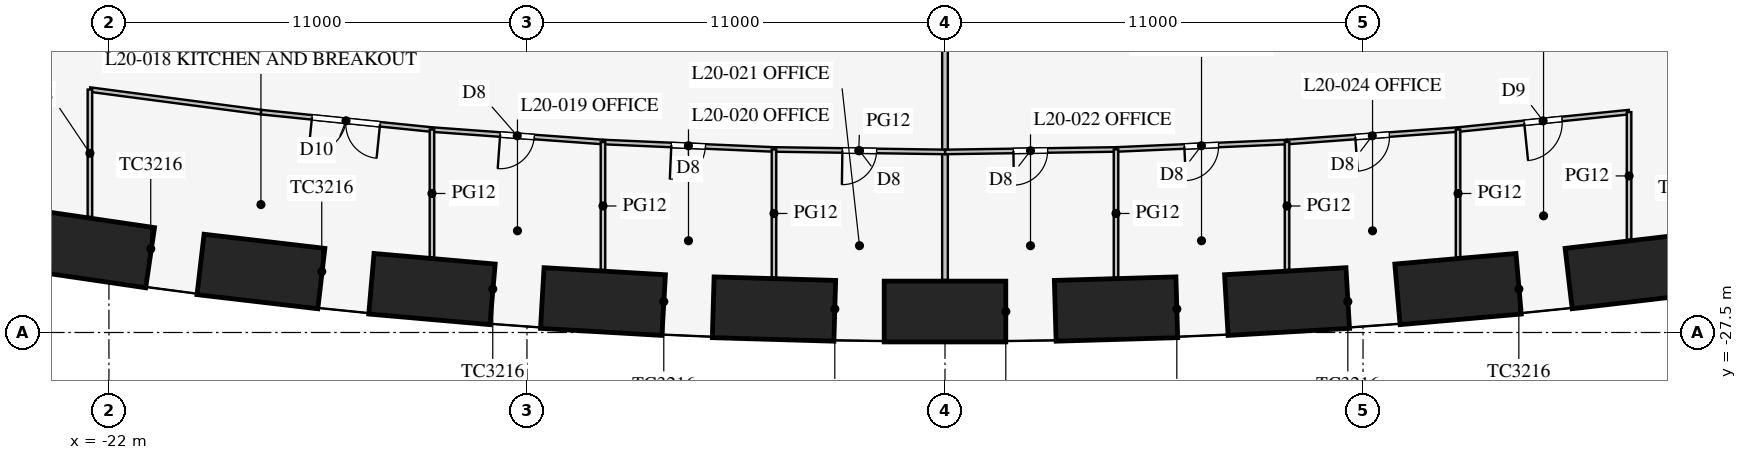
"""IFC4 building model, lengths in metres.
Left out: names, types, materials, properties, quantities, classifications, styles, units other than length and angle.
Written with IfcOpenShell. Run it as: python <this file> out.ifc"""

import sys

from ifc_helpers import new_model, si_unit, direction, frame, frame_2d, origin, origin_2d, place, context, subcontext, project, spatial, rectangle, extrude, element, fill, save


model = new_model("IFC4")
c1 = context("Model", 3, precision=1e-05, world=origin(), true_north=direction((0.0, 1.0)))
c2 = subcontext(c1, "Body", "Model", "MODEL_VIEW")
j1 = project(units=[si_unit("LENGTHUNIT", "METRE"), si_unit("PLANEANGLEUNIT", "RADIAN")], contexts=[c1])
p1 = place(None, origin())
s1 = spatial("IfcSite", under=j1, at=p1, CompositionType="ELEMENT")
p2 = place(p1, origin())
s2 = spatial("IfcBuilding", under=s1, at=p2, CompositionType="ELEMENT")
p3 = place(p2, frame((0.0, 0.0, 87.9)))
s3 = spatial("IfcBuildingStorey", under=s2, at=p3, CompositionType="ELEMENT", Elevation=87.9)
for number, where, z_axis, x_axis in (
    (1, (-22.5, -25.299, 0.0), (0.0, 0.0, 1.0), (0.989, -0.145, 0.0)),
    (2, (-18.0, -25.895, 0.0), (0.0, 0.0, 1.0), (0.993, -0.116, 0.0)),
    (3, (-13.5, -26.357, 0.0), (0.0, 0.0, 1.0), (0.996, -0.087, 0.0)),
    (4, (-9.0, -26.686, 0.0), (0.0, 0.0, 1.0), (0.998, -0.058, 0.0)),
    (5, (-4.5, -26.883, 0.0), (0.0, 0.0, 1.0), (1.0, -0.029, 0.0)),
    (6, (0.0, -26.949, 0.0), (0.0, 0.0, 1.0), (1.0, 0.0, 0.0)),
    (7, (4.5, -26.883, 0.0), (0.0, 0.0, 1.0), (1.0, 0.029, 0.0)),
    (8, (9.0, -26.686, 0.0), (0.0, 0.0, 1.0), (0.998, 0.058, 0.0)),
    (9, (13.5, -26.357, 0.0), (0.0, 0.0, 1.0), (0.996, 0.087, 0.0)),
    (10, (18.0, -25.895, 0.0), (0.0, 0.0, 1.0), (0.993, 0.116, 0.0)),
):
    element("IfcColumn", number, at=place(p3, frame(where, z_axis=z_axis, x_axis=x_axis)), inside=s3, PredefinedType="COLUMN", context=c2, shape_type="SweptSolid", body=[
        extrude(rectangle(XDim=3.2, YDim=1.6, at=origin_2d()), origin(), (0.0, 0.0, 1.0), 4.2),
    ])
p4 = place(p3, frame((0.0, -13.41, 0.0), z_axis=(0.0, 0.0, 1.0), x_axis=(0.0, -1.0, 0.0)))
e11 = element("IfcWall", 11, at=p4, inside=s3, PredefinedType="PARTITIONING", context=c2, shape_type="SweptSolid", body=[
    extrude(rectangle(XDim=12.709, YDim=0.15, at=frame_2d((6.354, 0.0))), origin(), (0.0, 0.0, 1.0), 2.15),
])
p5 = place(p3, frame((0.0, -22.749, 0.0), z_axis=(0.0, 0.0, 1.0), x_axis=(0.999894311967, 0.014538393859, 0.0)))
e12 = element("IfcWall", 12, at=p5, inside=s3, PredefinedType="PARTITIONING", context=c2, shape_type="SweptSolid", body=[
    extrude(rectangle(XDim=4.5, YDim=0.12, at=frame_2d((2.25, 0.0))), origin(), (0.0, 0.0, 1.0), 2.9),
])
p6 = place(p5, frame((1.8, 0.0, 0.15)))
e13 = element("IfcOpeningElement", 13, at=p6, cuts=e12, PredefinedType="OPENING", context=c2, shape_type="SweptSolid", body=[
    extrude(rectangle(XDim=0.9, YDim=2.1, at=frame_2d((0.45, 1.05))), frame((0.0, 0.07, 0.0), z_axis=(0.0, -1.0, 0.0), x_axis=(1.0, 0.0, 0.0)), (0.0, 0.0, 1.0), 0.14),
])
p7 = place(p3, frame((13.5, -22.16, 0.0), z_axis=(0.0, 0.0, 1.0), x_axis=(0.994833141332, 0.101523499286, 0.0)))
e14 = element("IfcWall", 14, at=p7, inside=s3, PredefinedType="PARTITIONING", context=c2, shape_type="SweptSolid", body=[
    extrude(rectangle(XDim=4.523, YDim=0.12, at=frame_2d((2.262, 0.0))), origin(), (0.0, 0.0, 1.0), 2.9),
])
p8 = place(p7, frame((1.75, 0.0, 0.15)))
e15 = element("IfcOpeningElement", 15, at=p8, cuts=e14, PredefinedType="OPENING", context=c2, shape_type="SweptSolid", body=[
    extrude(rectangle(XDim=1.0, YDim=2.1, at=frame_2d((0.5, 1.05))), frame((0.0, 0.07, 0.0), z_axis=(0.0, -1.0, 0.0), x_axis=(1.0, 0.0, 0.0)), (0.0, 0.0, 1.0), 0.14),
])
p9 = place(p3, frame((4.5, -22.683, 0.0), z_axis=(0.0, 0.0, 1.0), x_axis=(0.999052370647, 0.043524254212, 0.0)))
e16 = element("IfcWall", 16, at=p9, inside=s3, PredefinedType="PARTITIONING", context=c2, shape_type="SweptSolid", body=[
    extrude(rectangle(XDim=4.504, YDim=0.12, at=frame_2d((2.252, 0.0))), origin(), (0.0, 0.0, 1.0), 2.9),
])
p10 = place(p9, frame((1.8, 0.0, 0.15)))
e17 = element("IfcOpeningElement", 17, at=p10, cuts=e16, PredefinedType="OPENING", context=c2, shape_type="SweptSolid", body=[
    extrude(rectangle(XDim=0.9, YDim=2.1, at=frame_2d((0.45, 1.05))), frame((0.0, 0.07, 0.0), z_axis=(0.0, -1.0, 0.0), x_axis=(1.0, 0.0, 0.0)), (0.0, 0.0, 1.0), 0.14),
])
p11 = place(p3, frame((9.0, -22.487, 0.0), z_axis=(0.0, 0.0, 1.0), x_axis=(0.997363894896, 0.072562119306, 0.0)))
e18 = element("IfcWall", 18, at=p11, inside=s3, PredefinedType="PARTITIONING", context=c2, shape_type="SweptSolid", body=[
    extrude(rectangle(XDim=4.512, YDim=0.12, at=frame_2d((2.256, 0.0))), origin(), (0.0, 0.0, 1.0), 2.9),
])
p12 = place(p11, frame((1.8, 0.0, 0.15)))
e19 = element("IfcOpeningElement", 19, at=p12, cuts=e18, PredefinedType="OPENING", context=c2, shape_type="SweptSolid", body=[
    extrude(rectangle(XDim=0.9, YDim=2.1, at=frame_2d((0.45, 1.05))), frame((0.0, 0.07, 0.0), z_axis=(0.0, -1.0, 0.0), x_axis=(1.0, 0.0, 0.0)), (0.0, 0.0, 1.0), 0.14),
])
p13 = place(p3, frame((-13.5, -22.16, 0.0), z_axis=(0.0, 0.0, 1.0), x_axis=(0.997363894896, -0.072562119306, 0.0)))
e20 = element("IfcWall", 20, at=p13, inside=s3, PredefinedType="PARTITIONING", context=c2, shape_type="SweptSolid", body=[
    extrude(rectangle(XDim=4.512, YDim=0.12, at=frame_2d((2.256, 0.0))), origin(), (0.0, 0.0, 1.0), 2.9),
])
p14 = place(p13, frame((1.8, 0.0, 0.15)))
e21 = element("IfcOpeningElement", 21, at=p14, cuts=e20, PredefinedType="OPENING", context=c2, shape_type="SweptSolid", body=[
    extrude(rectangle(XDim=0.9, YDim=2.1, at=frame_2d((0.45, 1.05))), frame((0.0, 0.07, 0.0), z_axis=(0.0, -1.0, 0.0), x_axis=(1.0, 0.0, 0.0)), (0.0, 0.0, 1.0), 0.14),
])
p15 = place(p3, frame((-18.0, -21.701, 0.0), z_axis=(0.0, 0.0, 1.0), x_axis=(0.994833141332, -0.101523499286, 0.0)))
e22 = element("IfcWall", 22, at=p15, inside=s3, PredefinedType="PARTITIONING", context=c2, shape_type="SweptSolid", body=[
    extrude(rectangle(XDim=4.523, YDim=0.12, at=frame_2d((2.262, 0.0))), origin(), (0.0, 0.0, 1.0), 2.9),
])
p16 = place(p15, frame((1.35, 0.0, 0.15)))
e23 = element("IfcOpeningElement", 23, at=p16, cuts=e22, PredefinedType="OPENING", context=c2, shape_type="SweptSolid", body=[
    extrude(rectangle(XDim=1.8, YDim=2.1, at=frame_2d((0.9, 1.05))), frame((0.0, 0.07, 0.0), z_axis=(0.0, -1.0, 0.0), x_axis=(1.0, 0.0, 0.0)), (0.0, 0.0, 1.0), 0.14),
])
p17 = place(p3, frame((-22.5, -21.108, 0.0), z_axis=(0.0, 0.0, 1.0), x_axis=(0.991435244698, -0.130599217346, 0.0)))
e24 = element("IfcWall", 24, at=p17, inside=s3, PredefinedType="PARTITIONING", context=c2, shape_type="SweptSolid", body=[
    extrude(rectangle(XDim=4.539, YDim=0.12, at=frame_2d((2.27, 0.0))), origin(), (0.0, 0.0, 1.0), 2.9),
])
p18 = place(p3, frame((-4.5, -22.683, 0.0), z_axis=(0.0, 0.0, 1.0), x_axis=(0.999894311967, -0.014538393859, 0.0)))
e25 = element("IfcWall", 25, at=p18, inside=s3, PredefinedType="PARTITIONING", context=c2, shape_type="SweptSolid", body=[
    extrude(rectangle(XDim=4.5, YDim=0.12, at=frame_2d((2.25, 0.0))), origin(), (0.0, 0.0, 1.0), 2.9),
])
p19 = place(p18, frame((1.8, 0.0, 0.15)))
e26 = element("IfcOpeningElement", 26, at=p19, cuts=e25, PredefinedType="OPENING", context=c2, shape_type="SweptSolid", body=[
    extrude(rectangle(XDim=0.9, YDim=2.1, at=frame_2d((0.45, 1.05))), frame((0.0, 0.07, 0.0), z_axis=(0.0, -1.0, 0.0), x_axis=(1.0, 0.0, 0.0)), (0.0, 0.0, 1.0), 0.14),
])
p20 = place(p3, frame((-9.0, -22.487, 0.0), z_axis=(0.0, 0.0, 1.0), x_axis=(0.999052370647, -0.043524254212, 0.0)))
e27 = element("IfcWall", 27, at=p20, inside=s3, PredefinedType="PARTITIONING", context=c2, shape_type="SweptSolid", body=[
    extrude(rectangle(XDim=4.504, YDim=0.12, at=frame_2d((2.252, 0.0))), origin(), (0.0, 0.0, 1.0), 2.9),
])
p21 = place(p20, frame((1.8, 0.0, 0.15)))
e28 = element("IfcOpeningElement", 28, at=p21, cuts=e27, PredefinedType="OPENING", context=c2, shape_type="SweptSolid", body=[
    extrude(rectangle(XDim=0.9, YDim=2.1, at=frame_2d((0.45, 1.05))), frame((0.0, 0.07, 0.0), z_axis=(0.0, -1.0, 0.0), x_axis=(1.0, 0.0, 0.0)), (0.0, 0.0, 1.0), 0.14),
])
p22 = place(p3, frame((13.5, -22.16, 0.0), z_axis=(0.0, 0.0, 1.0), x_axis=(0.0, -1.0, 0.0)))
e29 = element("IfcWall", 29, at=p22, inside=s3, PredefinedType="PARTITIONING", context=c2, shape_type="SweptSolid", body=[
    extrude(rectangle(XDim=3.364, YDim=0.12, at=frame_2d((1.682, 0.0))), origin(), (0.0, 0.0, 1.0), 2.15),
])
p23 = place(p3, frame((18.0, -21.701, 0.0), z_axis=(0.0, 0.0, 1.0), x_axis=(0.0, -1.0, 0.0)))
e30 = element("IfcWall", 30, at=p23, inside=s3, PredefinedType="PARTITIONING", context=c2, shape_type="SweptSolid", body=[
    extrude(rectangle(XDim=3.359, YDim=0.12, at=frame_2d((1.679, 0.0))), origin(), (0.0, 0.0, 1.0), 2.15),
])
p24 = place(p3, frame((4.5, -22.683, 0.0), z_axis=(0.0, 0.0, 1.0), x_axis=(0.0, -1.0, 0.0)))
e31 = element("IfcWall", 31, at=p24, inside=s3, PredefinedType="PARTITIONING", context=c2, shape_type="SweptSolid", body=[
    extrude(rectangle(XDim=3.369, YDim=0.12, at=frame_2d((1.685, 0.0))), origin(), (0.0, 0.0, 1.0), 2.15),
])
p25 = place(p3, frame((9.0, -22.487, 0.0), z_axis=(0.0, 0.0, 1.0), x_axis=(0.0, -1.0, 0.0)))
e32 = element("IfcWall", 32, at=p25, inside=s3, PredefinedType="PARTITIONING", context=c2, shape_type="SweptSolid", body=[
    extrude(rectangle(XDim=3.367, YDim=0.12, at=frame_2d((1.684, 0.0))), origin(), (0.0, 0.0, 1.0), 2.15),
])
p26 = place(p3, frame((-13.5, -22.16, 0.0), z_axis=(0.0, 0.0, 1.0), x_axis=(0.0, -1.0, 0.0)))
e33 = element("IfcWall", 33, at=p26, inside=s3, PredefinedType="PARTITIONING", context=c2, shape_type="SweptSolid", body=[
    extrude(rectangle(XDim=3.364, YDim=0.12, at=frame_2d((1.682, 0.0))), origin(), (0.0, 0.0, 1.0), 2.15),
])
p27 = place(p3, frame((-22.5, -21.108, 0.0), z_axis=(0.0, 0.0, 1.0), x_axis=(0.0, -1.0, 0.0)))
e34 = element("IfcWall", 34, at=p27, inside=s3, PredefinedType="PARTITIONING", context=c2, shape_type="SweptSolid", body=[
    extrude(rectangle(XDim=3.353, YDim=0.12, at=frame_2d((1.676, 0.0))), origin(), (0.0, 0.0, 1.0), 2.35),
])
p28 = place(p3, frame((-4.5, -22.683, 0.0), z_axis=(0.0, 0.0, 1.0), x_axis=(0.0, -1.0, 0.0)))
e35 = element("IfcWall", 35, at=p28, inside=s3, PredefinedType="PARTITIONING", context=c2, shape_type="SweptSolid", body=[
    extrude(rectangle(XDim=3.369, YDim=0.12, at=frame_2d((1.685, 0.0))), origin(), (0.0, 0.0, 1.0), 2.15),
])
p29 = place(p3, frame((-9.0, -22.487, 0.0), z_axis=(0.0, 0.0, 1.0), x_axis=(0.0, -1.0, 0.0)))
e36 = element("IfcWall", 36, at=p29, inside=s3, PredefinedType="PARTITIONING", context=c2, shape_type="SweptSolid", body=[
    extrude(rectangle(XDim=3.367, YDim=0.12, at=frame_2d((1.684, 0.0))), origin(), (0.0, 0.0, 1.0), 2.15),
])
p30 = place(p16, frame((1.8, 0.0, 0.0), z_axis=(0.0, 0.0, 1.0), x_axis=(-1.0, 0.0, 0.0)))
e37 = element("IfcDoor", 37, at=p30, inside=s3, OperationType="DOUBLE_DOOR_SINGLE_SWING", PredefinedType="DOOR", context=c2, shape_type="SweptSolid", body=[
    extrude(rectangle(XDim=1.8, YDim=2.1, at=frame_2d((0.9, 1.05))), frame((0.0, 0.025, 0.0), z_axis=(0.0, -1.0, 0.0), x_axis=(1.0, 0.0, 0.0)), (0.0, 0.0, 1.0), 0.05),
])
fill(e23, e37)
p31 = place(p14, frame((0.9, 0.0, 0.0), z_axis=(0.0, 0.0, 1.0), x_axis=(-1.0, 0.0, 0.0)))
e38 = element("IfcDoor", 38, at=p31, inside=s3, OperationType="SINGLE_SWING_RIGHT", PredefinedType="DOOR", context=c2, shape_type="SweptSolid", body=[
    extrude(rectangle(XDim=0.9, YDim=2.1, at=frame_2d((0.45, 1.05))), frame((0.0, 0.025, 0.0), z_axis=(0.0, -1.0, 0.0), x_axis=(1.0, 0.0, 0.0)), (0.0, 0.0, 1.0), 0.05),
])
fill(e21, e38)
p32 = place(p21, frame((0.9, 0.0, 0.0), z_axis=(0.0, 0.0, 1.0), x_axis=(-1.0, 0.0, 0.0)))
e39 = element("IfcDoor", 39, at=p32, inside=s3, OperationType="SINGLE_SWING_RIGHT", PredefinedType="DOOR", context=c2, shape_type="SweptSolid", body=[
    extrude(rectangle(XDim=0.9, YDim=2.1, at=frame_2d((0.45, 1.05))), frame((0.0, 0.025, 0.0), z_axis=(0.0, -1.0, 0.0), x_axis=(1.0, 0.0, 0.0)), (0.0, 0.0, 1.0), 0.05),
])
fill(e28, e39)
p33 = place(p19, frame((0.9, 0.0, 0.0), z_axis=(0.0, 0.0, 1.0), x_axis=(-1.0, 0.0, 0.0)))
e40 = element("IfcDoor", 40, at=p33, inside=s3, OperationType="SINGLE_SWING_RIGHT", PredefinedType="DOOR", context=c2, shape_type="SweptSolid", body=[
    extrude(rectangle(XDim=0.9, YDim=2.1, at=frame_2d((0.45, 1.05))), frame((0.0, 0.025, 0.0), z_axis=(0.0, -1.0, 0.0), x_axis=(1.0, 0.0, 0.0)), (0.0, 0.0, 1.0), 0.05),
])
fill(e26, e40)
p34 = place(p6, frame((0.9, 0.0, 0.0), z_axis=(0.0, 0.0, 1.0), x_axis=(-1.0, 0.0, 0.0)))
e41 = element("IfcDoor", 41, at=p34, inside=s3, OperationType="SINGLE_SWING_RIGHT", PredefinedType="DOOR", context=c2, shape_type="SweptSolid", body=[
    extrude(rectangle(XDim=0.9, YDim=2.1, at=frame_2d((0.45, 1.05))), frame((0.0, 0.025, 0.0), z_axis=(0.0, -1.0, 0.0), x_axis=(1.0, 0.0, 0.0)), (0.0, 0.0, 1.0), 0.05),
])
fill(e13, e41)
p35 = place(p10, frame((0.9, 0.0, 0.0), z_axis=(0.0, 0.0, 1.0), x_axis=(-1.0, 0.0, 0.0)))
e42 = element("IfcDoor", 42, at=p35, inside=s3, OperationType="SINGLE_SWING_RIGHT", PredefinedType="DOOR", context=c2, shape_type="SweptSolid", body=[
    extrude(rectangle(XDim=0.9, YDim=2.1, at=frame_2d((0.45, 1.05))), frame((0.0, 0.025, 0.0), z_axis=(0.0, -1.0, 0.0), x_axis=(1.0, 0.0, 0.0)), (0.0, 0.0, 1.0), 0.05),
])
fill(e17, e42)
p36 = place(p12, frame((0.9, 0.0, 0.0), z_axis=(0.0, 0.0, 1.0), x_axis=(-1.0, 0.0, 0.0)))
e43 = element("IfcDoor", 43, at=p36, inside=s3, OperationType="SINGLE_SWING_RIGHT", PredefinedType="DOOR", context=c2, shape_type="SweptSolid", body=[
    extrude(rectangle(XDim=0.9, YDim=2.1, at=frame_2d((0.45, 1.05))), frame((0.0, 0.025, 0.0), z_axis=(0.0, -1.0, 0.0), x_axis=(1.0, 0.0, 0.0)), (0.0, 0.0, 1.0), 0.05),
])
fill(e19, e43)
p37 = place(p8, frame((1.0, 0.0, 0.0), z_axis=(0.0, 0.0, 1.0), x_axis=(-1.0, 0.0, 0.0)))
e44 = element("IfcDoor", 44, at=p37, inside=s3, OperationType="SINGLE_SWING_RIGHT", PredefinedType="DOOR", context=c2, shape_type="SweptSolid", body=[
    extrude(rectangle(XDim=1.0, YDim=2.1, at=frame_2d((0.5, 1.05))), frame((0.0, 0.025, 0.0), z_axis=(0.0, -1.0, 0.0), x_axis=(1.0, 0.0, 0.0)), (0.0, 0.0, 1.0), 0.05),
])
fill(e15, e44)
save(model, sys.argv[1])
